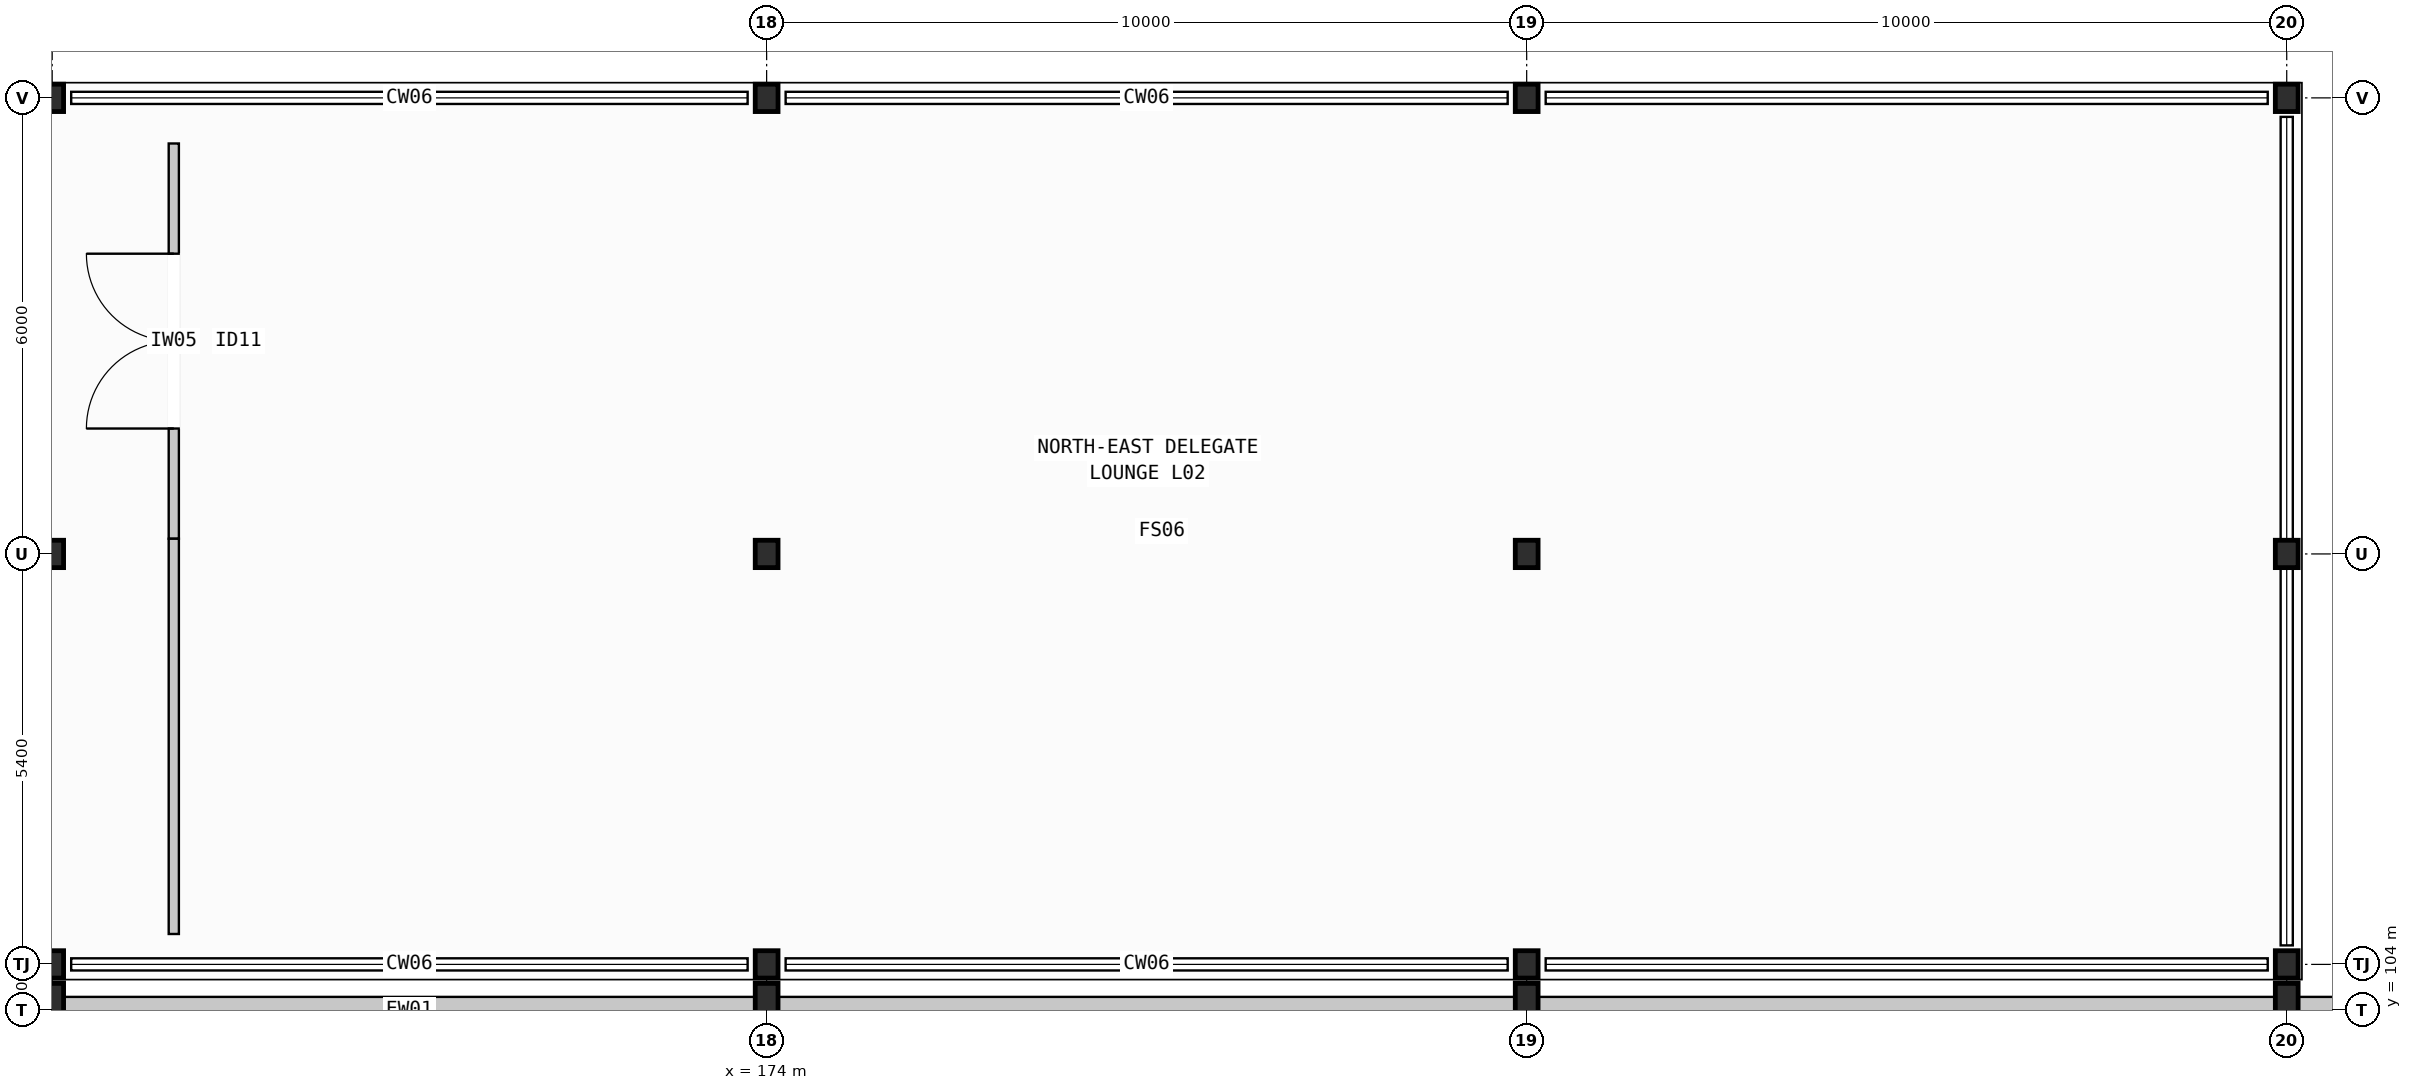
"""IFC4 building model, lengths in metres.
Left out: names, types, materials, properties, quantities, classifications, styles, units other than length and angle.
Written with IfcOpenShell. Run it as: python <this file> out.ifc"""

import sys

from ifc_helpers import new_model, si_unit, direction, frame, frame_2d, origin, origin_2d, place, context, subcontext, project, spatial, rectangle, i_section, extrude, element, fill, save


model = new_model("IFC4")
c1 = context("Model", 3, precision=1e-05, world=origin(), true_north=direction((0.0, 1.0)))
c2 = subcontext(c1, "Body", "Model", "MODEL_VIEW")
j1 = project(units=[si_unit("LENGTHUNIT", "METRE"), si_unit("PLANEANGLEUNIT", "RADIAN")], contexts=[c1])
p1 = place(None, origin())
s1 = spatial("IfcSite", under=j1, at=p1, CompositionType="ELEMENT")
p2 = place(p1, origin())
s2 = spatial("IfcBuilding", under=s1, at=p2, CompositionType="ELEMENT")
p3 = place(p2, frame((0.0, 0.0, 11.4)))
s3 = spatial("IfcBuildingStorey", under=s2, at=p3, CompositionType="ELEMENT", Elevation=11.4)
p4 = place(p3, frame((164.6, 104.0, 0.0), z_axis=(0.0, 0.0, 1.0), x_axis=(1.0, 0.0, 0.0)))
e1 = element("IfcColumn", 1, at=p4, inside=s3, PredefinedType="COLUMN", context=c2, shape_type="SweptSolid", body=[
    extrude(i_section(OverallWidth=0.3, OverallDepth=0.7, WebThickness=0.017, FlangeThickness=0.032, FilletRadius=0.027, at=origin_2d()), origin(), (0.0, 0.0, 1.0), 5.4),
])
for number, where, z_axis, x_axis in (
    (2, (164.6, 104.6, 0.0), (0.0, 0.0, 1.0), (1.0, 0.0, 0.0)),
    (3, (164.6, 110.0, 0.0), (0.0, 0.0, 1.0), (1.0, 0.0, 0.0)),
    (4, (164.6, 116.0, 0.0), (0.0, 0.0, 1.0), (1.0, 0.0, 0.0)),
):
    element("IfcColumn", number, at=place(p3, frame(where, z_axis=z_axis, x_axis=x_axis)), inside=s3, PredefinedType="COLUMN", context=c2, shape_type="SweptSolid", body=[
        extrude(i_section(OverallWidth=0.3, OverallDepth=0.36, WebThickness=0.012, FlangeThickness=0.022, FilletRadius=0.027, at=origin_2d()), origin(), (0.0, 0.0, 1.0), 5.4),
    ])
p5 = place(p3, frame((174.0, 104.0, 0.0), z_axis=(0.0, 0.0, 1.0), x_axis=(1.0, 0.0, 0.0)))
e5 = element("IfcColumn", 5, at=p5, inside=s3, PredefinedType="COLUMN", context=c2, shape_type="SweptSolid", body=[
    extrude(i_section(OverallWidth=0.3, OverallDepth=0.7, WebThickness=0.017, FlangeThickness=0.032, FilletRadius=0.027, at=origin_2d()), origin(), (0.0, 0.0, 1.0), 5.4),
])
for number, where, z_axis, x_axis in (
    (6, (174.0, 104.6, 0.0), (0.0, 0.0, 1.0), (1.0, 0.0, 0.0)),
    (7, (174.0, 110.0, 0.0), (0.0, 0.0, 1.0), (1.0, 0.0, 0.0)),
    (8, (174.0, 116.0, 0.0), (0.0, 0.0, 1.0), (1.0, 0.0, 0.0)),
):
    element("IfcColumn", number, at=place(p3, frame(where, z_axis=z_axis, x_axis=x_axis)), inside=s3, PredefinedType="COLUMN", context=c2, shape_type="SweptSolid", body=[
        extrude(i_section(OverallWidth=0.3, OverallDepth=0.36, WebThickness=0.012, FlangeThickness=0.022, FilletRadius=0.027, at=origin_2d()), origin(), (0.0, 0.0, 1.0), 5.4),
    ])
p6 = place(p3, frame((184.0, 104.0, 0.0), z_axis=(0.0, 0.0, 1.0), x_axis=(1.0, 0.0, 0.0)))
e9 = element("IfcColumn", 9, at=p6, inside=s3, PredefinedType="COLUMN", context=c2, shape_type="SweptSolid", body=[
    extrude(i_section(OverallWidth=0.3, OverallDepth=0.7, WebThickness=0.017, FlangeThickness=0.032, FilletRadius=0.027, at=origin_2d()), origin(), (0.0, 0.0, 1.0), 5.4),
])
for number, where, z_axis, x_axis in (
    (10, (184.0, 104.6, 0.0), (0.0, 0.0, 1.0), (1.0, 0.0, 0.0)),
    (11, (184.0, 110.0, 0.0), (0.0, 0.0, 1.0), (1.0, 0.0, 0.0)),
    (12, (184.0, 116.0, 0.0), (0.0, 0.0, 1.0), (1.0, 0.0, 0.0)),
):
    element("IfcColumn", number, at=place(p3, frame(where, z_axis=z_axis, x_axis=x_axis)), inside=s3, PredefinedType="COLUMN", context=c2, shape_type="SweptSolid", body=[
        extrude(i_section(OverallWidth=0.3, OverallDepth=0.36, WebThickness=0.012, FlangeThickness=0.022, FilletRadius=0.027, at=origin_2d()), origin(), (0.0, 0.0, 1.0), 5.4),
    ])
p7 = place(p3, frame((194.0, 104.0, 0.0), z_axis=(0.0, 0.0, 1.0), x_axis=(1.0, 0.0, 0.0)))
e13 = element("IfcColumn", 13, at=p7, inside=s3, PredefinedType="COLUMN", context=c2, shape_type="SweptSolid", body=[
    extrude(i_section(OverallWidth=0.3, OverallDepth=0.7, WebThickness=0.017, FlangeThickness=0.032, FilletRadius=0.027, at=origin_2d()), origin(), (0.0, 0.0, 1.0), 5.4),
])
for number, where, z_axis, x_axis in (
    (14, (194.0, 104.6, 0.0), (0.0, 0.0, 1.0), (1.0, 0.0, 0.0)),
    (15, (194.0, 110.0, 0.0), (0.0, 0.0, 1.0), (1.0, 0.0, 0.0)),
    (16, (194.0, 116.0, 0.0), (0.0, 0.0, 1.0), (1.0, 0.0, 0.0)),
):
    element("IfcColumn", number, at=place(p3, frame(where, z_axis=z_axis, x_axis=x_axis)), inside=s3, PredefinedType="COLUMN", context=c2, shape_type="SweptSolid", body=[
        extrude(i_section(OverallWidth=0.3, OverallDepth=0.36, WebThickness=0.012, FlangeThickness=0.022, FilletRadius=0.027, at=origin_2d()), origin(), (0.0, 0.0, 1.0), 5.4),
    ])
p8 = place(p3, frame((164.746, 104.0, 0.0), z_axis=(0.0, 0.0, 1.0), x_axis=(1.0, 0.0, 0.0)))
e17 = element("IfcWall", 17, at=p8, inside=s3, PredefinedType="STANDARD", context=c2, shape_type="SweptSolid", body=[
    extrude(rectangle(XDim=9.108, YDim=0.345, at=frame_2d((4.554, 0.0))), origin(), (0.0, 0.0, 1.0), 4.305),
])
p9 = place(p3, frame((174.146, 104.0, 0.0), z_axis=(0.0, 0.0, 1.0), x_axis=(1.0, 0.0, 0.0)))
e18 = element("IfcWall", 18, at=p9, inside=s3, PredefinedType="STANDARD", context=c2, shape_type="SweptSolid", body=[
    extrude(rectangle(XDim=9.708, YDim=0.345, at=frame_2d((4.854, 0.0))), origin(), (0.0, 0.0, 1.0), 4.305),
])
p10 = place(p3, frame((184.146, 104.0, 0.0), z_axis=(0.0, 0.0, 1.0), x_axis=(1.0, 0.0, 0.0)))
e19 = element("IfcWall", 19, at=p10, inside=s3, PredefinedType="STANDARD", context=c2, shape_type="SweptSolid", body=[
    extrude(rectangle(XDim=9.708, YDim=0.345, at=frame_2d((4.854, 0.0))), origin(), (0.0, 0.0, 1.0), 4.345),
])
p11 = place(p3, frame((194.146, 104.0, 0.0), z_axis=(0.0, 0.0, 1.0), x_axis=(1.0, 0.0, 0.0)))
e20 = element("IfcWall", 20, at=p11, inside=s3, PredefinedType="STANDARD", context=c2, shape_type="SweptSolid", body=[
    extrude(rectangle(XDim=9.708, YDim=0.345, at=frame_2d((4.854, 0.0))), origin(), (0.0, 0.0, 1.0), 4.355),
])
p12 = place(p3, frame((166.2, 110.2, 0.0), z_axis=(0.0, 0.0, 1.0), x_axis=(0.0, 1.0, 0.0)))
e21 = element("IfcWall", 21, at=p12, inside=s3, PredefinedType="PARTITIONING", context=c2, shape_type="SweptSolid", body=[
    extrude(rectangle(XDim=5.2, YDim=0.134, at=frame_2d((2.6, 0.0))), origin(), (0.0, 0.0, 1.0), 4.4),
])
p13 = place(p12, frame((1.45, 0.0, 0.0)))
e22 = element("IfcOpeningElement", 22, at=p13, cuts=e21, PredefinedType="OPENING", context=c2, shape_type="SweptSolid", body=[
    extrude(rectangle(XDim=2.3, YDim=2.36, at=frame_2d((1.15, 1.18))), frame((0.0, 0.077, 0.0), z_axis=(0.0, -1.0, 0.0), x_axis=(1.0, 0.0, 0.0)), (0.0, 0.0, 1.0), 0.154),
])
p14 = place(p3, frame((166.2, 105.0, 0.0), z_axis=(0.0, 0.0, 1.0), x_axis=(0.0, 1.0, 0.0)))
e23 = element("IfcWall", 23, at=p14, inside=s3, PredefinedType="PARTITIONING", context=c2, shape_type="SweptSolid", body=[
    extrude(rectangle(XDim=5.2, YDim=0.134, at=frame_2d((2.6, 0.0))), origin(), (0.0, 0.0, 1.0), 4.4),
])
p15 = place(p13, origin())
e24 = element("IfcDoor", 24, at=p15, inside=s3, OperationType="DOUBLE_DOOR_SINGLE_SWING", PredefinedType="DOOR", context=c2, shape_type="SweptSolid", body=[
    extrude(rectangle(XDim=2.3, YDim=2.36, at=frame_2d((1.15, 1.18))), frame((0.0, 0.025, 0.0), z_axis=(0.0, -1.0, 0.0), x_axis=(1.0, 0.0, 0.0)), (0.0, 0.0, 1.0), 0.05),
])
fill(e22, e24)
save(model, sys.argv[1])
